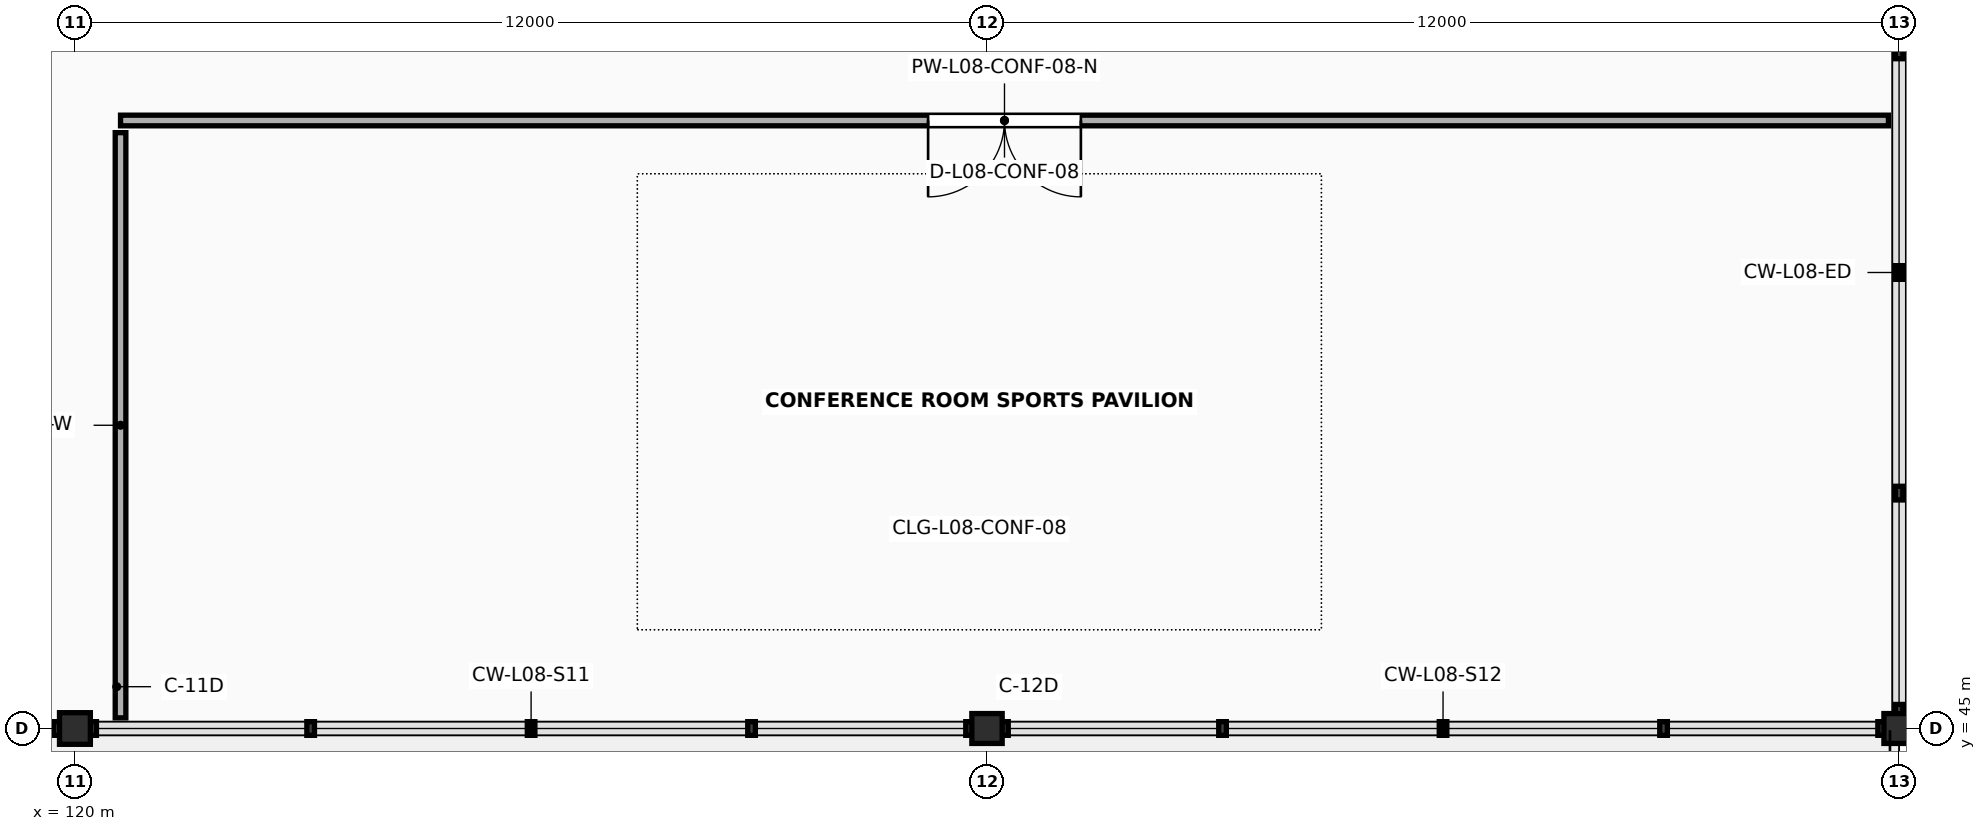
"""IFC4 building model, lengths in metres.
Left out: names, types, materials, properties, quantities, classifications, styles, units other than length and angle.
Written with IfcOpenShell. Run it as: python <this file> out.ifc"""

import sys

from ifc_helpers import new_model, si_unit, direction, frame, frame_2d, origin, origin_2d, place, context, subcontext, project, spatial, rectangle, i_section, extrude, element, fill, save


model = new_model("IFC4")
c1 = context("Model", 3, precision=1e-05, world=origin(), true_north=direction((0.0, 1.0)))
c2 = subcontext(c1, "Body", "Model", "MODEL_VIEW")
j1 = project(units=[si_unit("LENGTHUNIT", "METRE"), si_unit("PLANEANGLEUNIT", "RADIAN")], contexts=[c1])
p1 = place(None, origin())
s1 = spatial("IfcSite", under=j1, at=p1, CompositionType="ELEMENT")
p2 = place(p1, origin())
s2 = spatial("IfcBuilding", under=s1, at=p2, CompositionType="ELEMENT")
p3 = place(p2, frame((0.0, 0.0, 32.4)))
s3 = spatial("IfcBuildingStorey", under=s2, at=p3, CompositionType="ELEMENT", Elevation=32.4)
p4 = place(p3, frame((120.0, 45.0, 0.0), z_axis=(0.0, 0.0, 1.0), x_axis=(1.0, 0.0, 0.0)))
e1 = element("IfcColumn", 1, at=p4, inside=s3, PredefinedType="COLUMN", context=c2, shape_type="SweptSolid", body=[
    extrude(i_section(OverallWidth=0.406, OverallDepth=0.416, WebThickness=0.03, FlangeThickness=0.048, FilletRadius=0.018, at=origin_2d()), origin(), (0.0, 0.0, 1.0), 5.2),
])
for number, where, z_axis, x_axis in (
    (2, (132.0, 45.0, 0.0), (0.0, 0.0, 1.0), (1.0, 0.0, 0.0)),
    (3, (144.0, 45.0, 0.0), (0.0, 0.0, 1.0), (1.0, 0.0, 0.0)),
):
    element("IfcColumn", number, at=place(p3, frame(where, z_axis=z_axis, x_axis=x_axis)), inside=s3, PredefinedType="COLUMN", context=c2, shape_type="SweptSolid", body=[
        extrude(i_section(OverallWidth=0.399, OverallDepth=0.393, WebThickness=0.023, FlangeThickness=0.037, FilletRadius=0.018, at=origin_2d()), origin(), (0.0, 0.0, 1.0), 5.2),
    ])
p5 = place(p3, frame((120.6, 53.0, 0.0), z_axis=(0.0, 0.0, 1.0), x_axis=(1.0, 0.0, 0.0)))
e4 = element("IfcWall", 4, at=p5, inside=s3, PredefinedType="PARTITIONING", context=c2, shape_type="SweptSolid", body=[
    extrude(rectangle(XDim=23.26, YDim=0.14, at=frame_2d((11.63, 0.0))), origin(), (0.0, 0.0, 1.0), 2.88),
])
p6 = place(p5, frame((10.625, 0.0, 0.0)))
e5 = element("IfcOpeningElement", 5, at=p6, cuts=e4, PredefinedType="OPENING", context=c2, shape_type="SweptSolid", body=[
    extrude(rectangle(XDim=2.01, YDim=2.45, at=frame_2d((1.005, 1.225))), frame((0.0, 0.085, 0.0), z_axis=(0.0, -1.0, 0.0), x_axis=(1.0, 0.0, 0.0)), (0.0, 0.0, 1.0), 0.17),
])
p7 = place(p3, frame((120.6, 45.14, 0.0), z_axis=(0.0, 0.0, 1.0), x_axis=(0.0, 1.0, 0.0)))
e6 = element("IfcWall", 6, at=p7, inside=s3, PredefinedType="PARTITIONING", context=c2, shape_type="SweptSolid", body=[
    extrude(rectangle(XDim=7.7, YDim=0.14, at=frame_2d((3.85, 0.0))), origin(), (0.0, 0.0, 1.0), 2.88),
])
p8 = place(p6, origin())
e7 = element("IfcDoor", 7, at=p8, inside=s3, OperationType="DOUBLE_DOOR_SINGLE_SWING", PredefinedType="DOOR", context=c2, shape_type="SweptSolid", body=[
    extrude(rectangle(XDim=2.01, YDim=2.45, at=frame_2d((1.005, 1.225))), frame((0.0, 0.025, 0.0), z_axis=(0.0, -1.0, 0.0), x_axis=(1.0, 0.0, 0.0)), (0.0, 0.0, 1.0), 0.05),
])
fill(e5, e7)
save(model, sys.argv[1])
